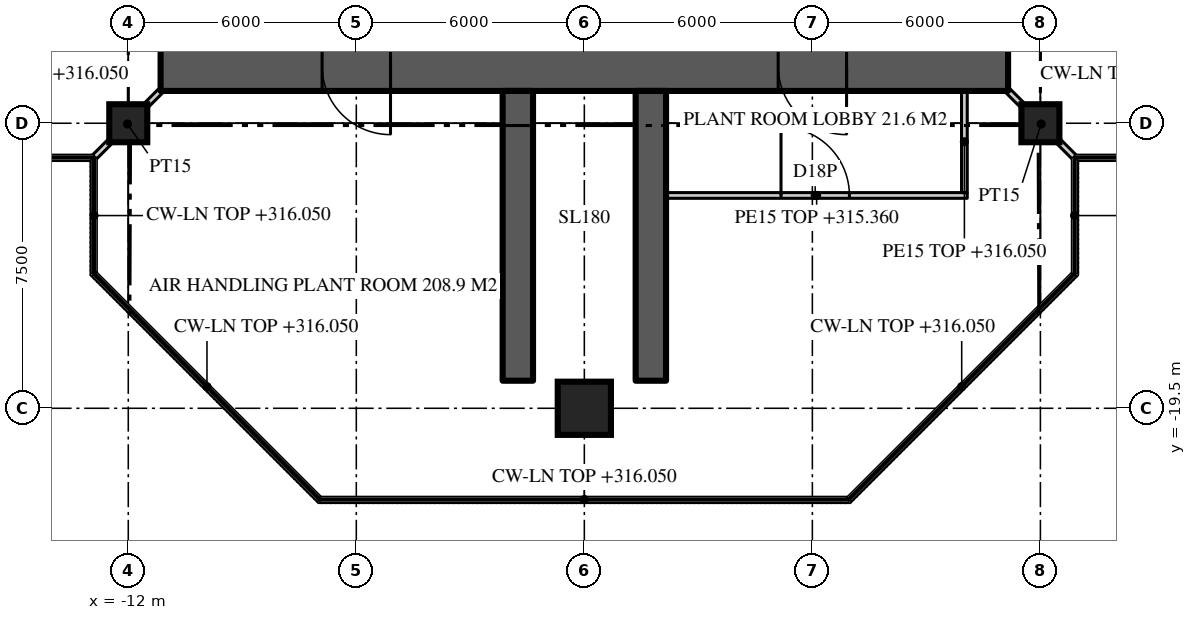
"""IFC4 building model, lengths in metres.
Left out: names, types, materials, properties, quantities, classifications, styles, units other than length and angle.
Written with IfcOpenShell. Run it as: python <this file> out.ifc"""

import sys

from ifc_helpers import new_model, si_unit, direction, frame, frame_2d, origin, origin_2d, place, context, subcontext, project, spatial, rectangle, extrude, element, fill, save


model = new_model("IFC4")
c1 = context("Model", 3, precision=1e-05, world=origin(), true_north=direction((0.0, 1.0)))
c2 = subcontext(c1, "Body", "Model", "MODEL_VIEW")
j1 = project(units=[si_unit("LENGTHUNIT", "METRE"), si_unit("PLANEANGLEUNIT", "RADIAN")], contexts=[c1])
p1 = place(None, origin())
s1 = spatial("IfcSite", under=j1, at=p1, CompositionType="ELEMENT")
p2 = place(p1, origin())
s2 = spatial("IfcBuilding", under=s1, at=p2, CompositionType="ELEMENT")
p3 = place(p2, frame((0.0, 0.0, 311.3)))
s3 = spatial("IfcBuildingStorey", under=s2, at=p3, CompositionType="ELEMENT", Elevation=311.3)
p4 = place(p3, frame((11.15, -10.5, 0.0), z_axis=(0.0, 0.0, 1.0), x_axis=(-1.0, 0.0, 0.0)))
e1 = element("IfcWall", 1, at=p4, inside=s3, PredefinedType="SHEAR", context=c2, shape_type="SweptSolid", body=[
    extrude(rectangle(XDim=22.3, YDim=1.3, at=frame_2d((11.15, 0.0))), origin(), (0.0, 0.0, 1.0), 5.0),
])
p5 = place(p4, frame((16.25, 0.0, 0.0)))
e2 = element("IfcOpeningElement", 2, at=p5, cuts=e1, PredefinedType="OPENING", context=c2, shape_type="SweptSolid", body=[
    extrude(rectangle(XDim=1.8, YDim=2.2, at=frame_2d((0.9, 1.1))), frame((0.0, 0.66, 0.0), z_axis=(0.0, -1.0, 0.0), x_axis=(1.0, 0.0, 0.0)), (0.0, 0.0, 1.0), 1.32),
])
p6 = place(p4, frame((4.25, 0.0, 0.0)))
e3 = element("IfcOpeningElement", 3, at=p6, cuts=e1, PredefinedType="OPENING", context=c2, shape_type="SweptSolid", body=[
    extrude(rectangle(XDim=1.8, YDim=2.2, at=frame_2d((0.9, 1.1))), frame((0.0, 0.66, 0.0), z_axis=(0.0, -1.0, 0.0), x_axis=(1.0, 0.0, 0.0)), (0.0, 0.0, 1.0), 1.32),
])
for number, where, z_axis, x_axis in (
    (4, (-1.75, -11.15, 0.0), (0.0, 0.0, 1.0), (0.0, -1.0, 0.0)),
    (5, (1.75, -11.15, 0.0), (0.0, 0.0, 1.0), (0.0, -1.0, 0.0)),
):
    element("IfcWall", number, at=place(p3, frame(where, z_axis=z_axis, x_axis=x_axis)), inside=s3, PredefinedType="SHEAR", context=c2, shape_type="SweptSolid", body=[
        extrude(rectangle(XDim=7.625, YDim=0.8, at=frame_2d((3.812, 0.0))), origin(), (0.0, 0.0, 1.0), 5.0),
    ])
p7 = place(p3, frame((0.0, -19.5, 0.0), z_axis=(0.0, 0.0, 1.0), x_axis=(1.0, 0.0, 0.0)))
e6 = element("IfcColumn", 6, at=p7, inside=s3, PredefinedType="COLUMN", context=c2, shape_type="SweptSolid", body=[
    extrude(rectangle(XDim=1.4, YDim=1.4, at=origin_2d()), origin(), (0.0, 0.0, 1.0), 5.0),
])
for number, where, z_axis, x_axis in (
    (7, (-12.0, -12.0, 0.0), (0.0, 0.0, 1.0), (1.0, 0.0, 0.0)),
    (8, (12.0, -12.0, 0.0), (0.0, 0.0, 1.0), (1.0, 0.0, 0.0)),
):
    element("IfcColumn", number, at=place(p3, frame(where, z_axis=z_axis, x_axis=x_axis)), inside=s3, PredefinedType="COLUMN", context=c2, shape_type="SweptSolid", body=[
        extrude(rectangle(XDim=1.0, YDim=1.0, at=origin_2d()), origin(), (0.0, 0.0, 1.0), 5.0),
    ])
p8 = place(p3, frame((2.15, -13.9, 0.0), z_axis=(0.0, 0.0, 1.0), x_axis=(1.0, 0.0, 0.0)))
e9 = element("IfcWall", 9, at=p8, inside=s3, PredefinedType="SOLIDWALL", context=c2, shape_type="SweptSolid", body=[
    extrude(rectangle(XDim=7.925, YDim=0.15, at=frame_2d((3.962, 0.0))), origin(), (0.0, 0.0, 1.0), 4.06),
])
p9 = place(p8, frame((3.025, 0.0, 0.0)))
e10 = element("IfcOpeningElement", 10, at=p9, cuts=e9, PredefinedType="OPENING", context=c2, shape_type="SweptSolid", body=[
    extrude(rectangle(XDim=1.8, YDim=2.4, at=frame_2d((0.9, 1.2))), frame((0.0, 0.085, 0.0), z_axis=(0.0, -1.0, 0.0), x_axis=(1.0, 0.0, 0.0)), (0.0, 0.0, 1.0), 0.17),
])
p10 = place(p3, frame((10.0, -11.15, 0.0), z_axis=(0.0, 0.0, 1.0), x_axis=(0.0, -1.0, 0.0)))
e11 = element("IfcWall", 11, at=p10, inside=s3, PredefinedType="SOLIDWALL", context=c2, shape_type="SweptSolid", body=[
    extrude(rectangle(XDim=2.675, YDim=0.15, at=frame_2d((1.337, 0.0))), origin(), (0.0, 0.0, 1.0), 4.75),
])
for number, where, z_axis, x_axis in (
    (12, (-11.15, -11.15, 0.0), (0.0, 0.0, 1.0), (-0.707, -0.707, 0.0)),
    (13, (11.15, -11.15, 0.0), (0.0, 0.0, 1.0), (0.707, -0.707, 0.0)),
):
    element("IfcWall", number, at=place(p3, frame(where, z_axis=z_axis, x_axis=x_axis)), inside=s3, PredefinedType="PARTITIONING", context=c2, shape_type="SweptSolid", body=[
        extrude(rectangle(XDim=2.461, YDim=0.15, at=frame_2d((1.23, 0.0))), origin(), (0.0, 0.0, 1.0), 4.75),
    ])
p11 = place(p5, origin())
e14 = element("IfcDoor", 14, at=p11, inside=s3, OperationType="DOUBLE_DOOR_DOUBLE_SWING", PredefinedType="DOOR", context=c2, shape_type="SweptSolid", body=[
    extrude(rectangle(XDim=1.8, YDim=2.2, at=frame_2d((0.9, 1.1))), frame((0.0, 0.025, 0.0), z_axis=(0.0, -1.0, 0.0), x_axis=(1.0, 0.0, 0.0)), (0.0, 0.0, 1.0), 0.05),
])
fill(e2, e14)
p12 = place(p6, origin())
e15 = element("IfcDoor", 15, at=p12, inside=s3, OperationType="DOUBLE_DOOR_DOUBLE_SWING", PredefinedType="DOOR", context=c2, shape_type="SweptSolid", body=[
    extrude(rectangle(XDim=1.8, YDim=2.2, at=frame_2d((0.9, 1.1))), frame((0.0, 0.025, 0.0), z_axis=(0.0, -1.0, 0.0), x_axis=(1.0, 0.0, 0.0)), (0.0, 0.0, 1.0), 0.05),
])
fill(e3, e15)
p13 = place(p9, origin())
e16 = element("IfcDoor", 16, at=p13, inside=s3, OperationType="DOUBLE_DOOR_DOUBLE_SWING", PredefinedType="DOOR", context=c2, shape_type="SweptSolid", body=[
    extrude(rectangle(XDim=1.8, YDim=2.4, at=frame_2d((0.9, 1.2))), frame((0.0, 0.025, 0.0), z_axis=(0.0, -1.0, 0.0), x_axis=(1.0, 0.0, 0.0)), (0.0, 0.0, 1.0), 0.05),
])
fill(e10, e16)
save(model, sys.argv[1])
